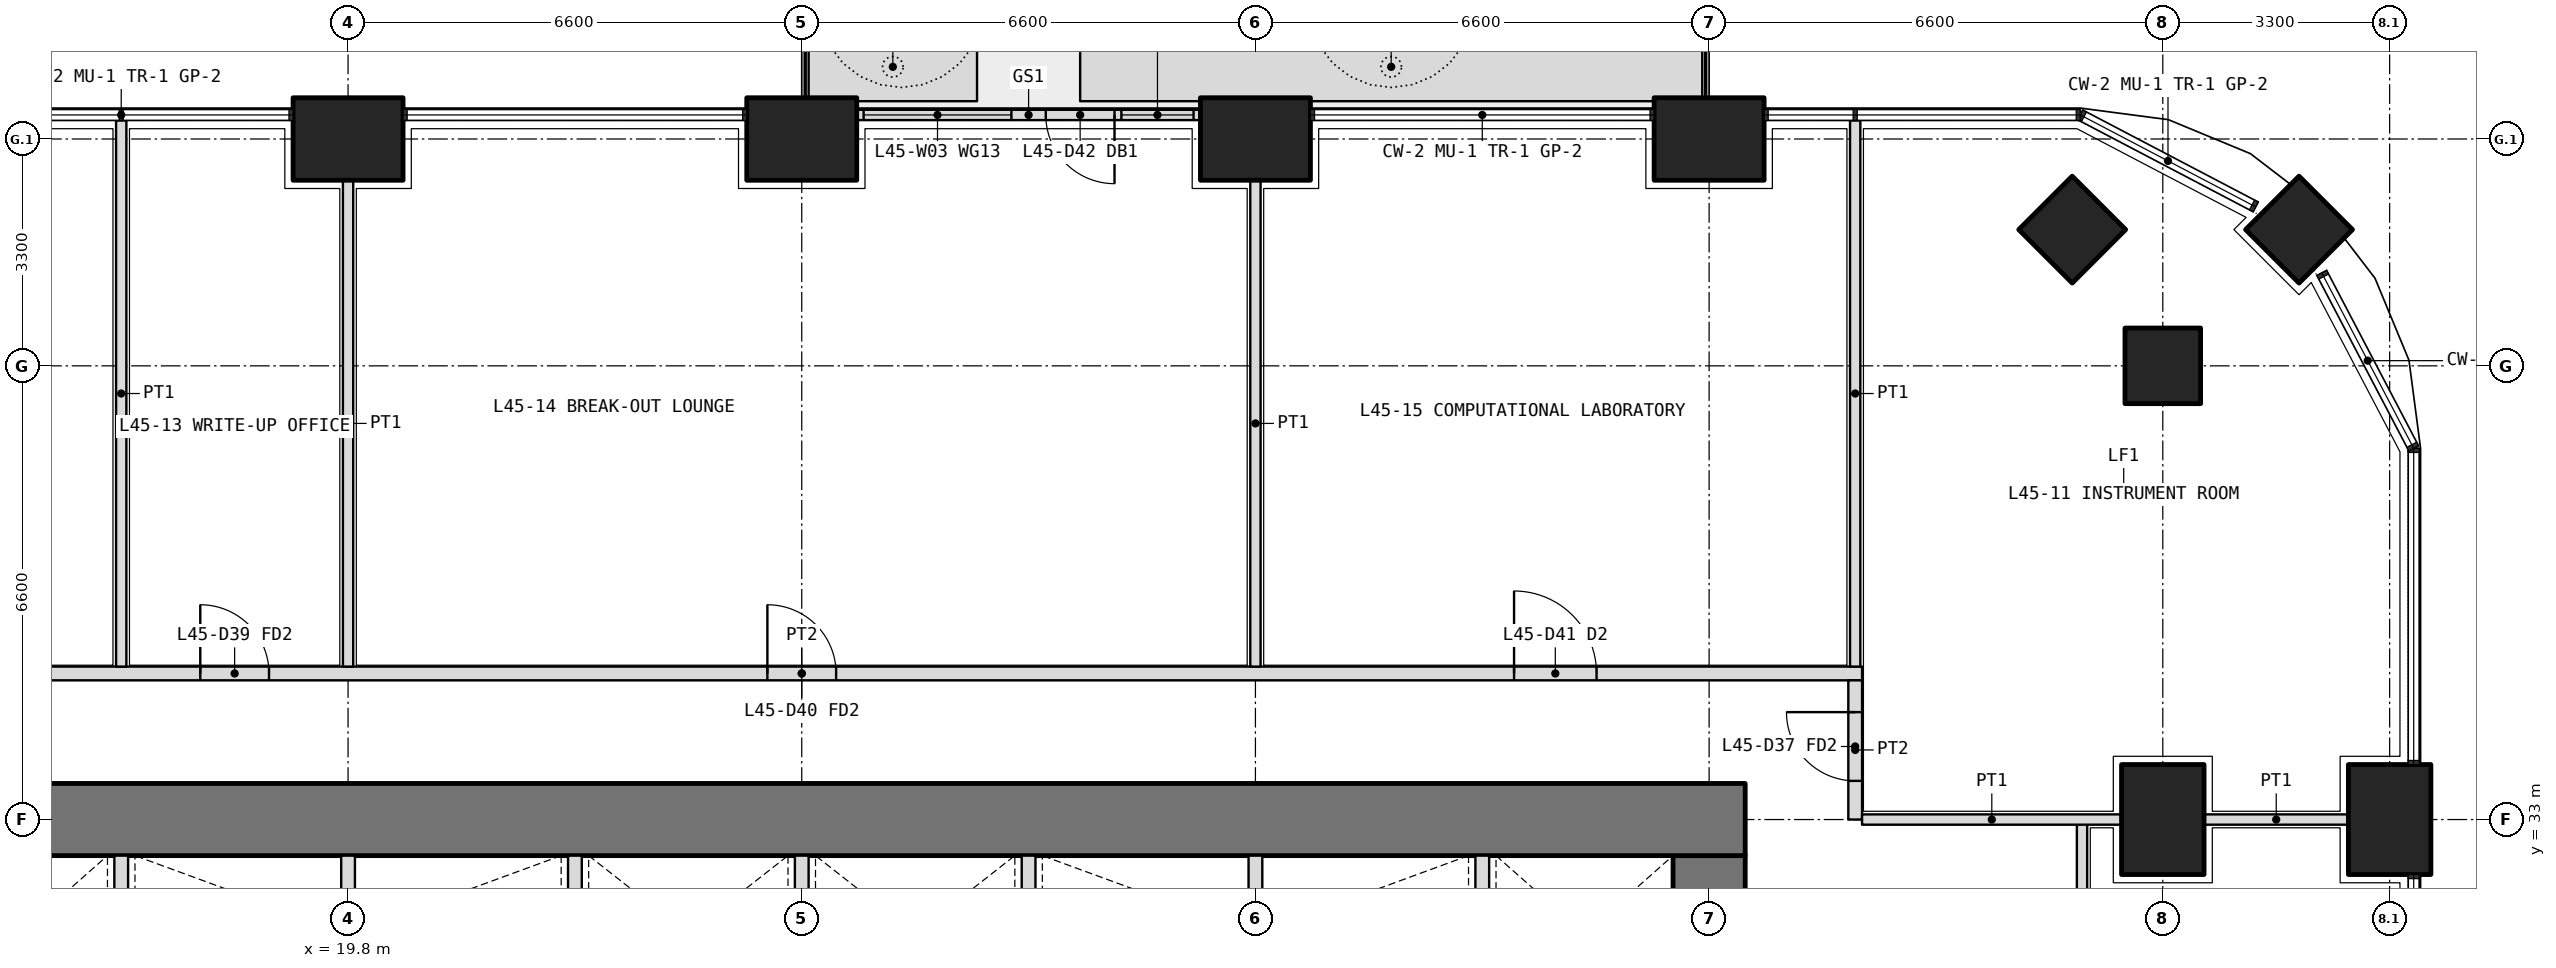
"""IFC4 building model, lengths in metres.
Left out: names, types, materials, properties, quantities, classifications, styles, units other than length and angle.
Written with IfcOpenShell. Run it as: python <this file> out.ifc"""

import sys

from ifc_helpers import new_model, si_unit, direction, frame, frame_2d, origin, origin_2d, place, context, subcontext, project, spatial, polyline, rectangle, outline, extrude, element, fill, save


model = new_model("IFC4")
c1 = context("Model", 3, precision=1e-05, world=origin(), true_north=direction((0.0, 1.0)))
c2 = subcontext(c1, "Body", "Model", "MODEL_VIEW")
j1 = project(units=[si_unit("LENGTHUNIT", "METRE"), si_unit("PLANEANGLEUNIT", "RADIAN")], contexts=[c1])
p1 = place(None, origin())
s1 = spatial("IfcSite", under=j1, at=p1, CompositionType="ELEMENT")
p2 = place(p1, origin())
s2 = spatial("IfcBuilding", under=s1, at=p2, CompositionType="ELEMENT")
p3 = place(p2, frame((0.0, 0.0, 197.7)))
s3 = spatial("IfcBuildingStorey", under=s2, at=p3, CompositionType="ELEMENT", Elevation=197.7)
p4 = place(p3, frame((48.182, 41.582, 0.0), z_axis=(0.0, 0.0, 1.0), x_axis=(0.707106781187, 0.707106781187, 0.0)))
e1 = element("IfcColumn", 1, at=p4, inside=s3, PredefinedType="COLUMN", context=c2, shape_type="SweptSolid", body=[
    extrude(rectangle(XDim=1.1, YDim=1.1, at=origin_2d()), origin(), (0.0, 0.0, 1.0), 4.2),
])
for number, where, z_axis, x_axis in (
    (2, (49.5, 33.0, 0.0), (0.0, 0.0, 1.0), (0.0, 1.0, 0.0)),
    (3, (19.8, 42.9, 0.0), (0.0, 0.0, 1.0), (1.0, 0.0, 0.0)),
    (4, (26.4, 42.9, 0.0), (0.0, 0.0, 1.0), (1.0, 0.0, 0.0)),
    (5, (33.0, 42.9, 0.0), (0.0, 0.0, 1.0), (1.0, 0.0, 0.0)),
    (6, (39.6, 42.9, 0.0), (0.0, 0.0, 1.0), (1.0, 0.0, 0.0)),
):
    element("IfcColumn", number, at=place(p3, frame(where, z_axis=z_axis, x_axis=x_axis)), inside=s3, PredefinedType="COLUMN", context=c2, shape_type="SweptSolid", body=[
        extrude(rectangle(XDim=1.6, YDim=1.2, at=origin_2d()), origin(), (0.0, 0.0, 1.0), 4.2),
    ])
for number, where, z_axis, x_axis in (
    (7, (46.2, 39.6, 0.0), (0.0, 0.0, 1.0), (1.0, 0.0, 0.0)),
    (8, (44.882, 41.582, 0.0), (0.0, 0.0, 1.0), (0.707, 0.707, 0.0)),
):
    element("IfcColumn", number, at=place(p3, frame(where, z_axis=z_axis, x_axis=x_axis)), inside=s3, PredefinedType="COLUMN", context=c2, shape_type="SweptSolid", body=[
        extrude(rectangle(XDim=1.1, YDim=1.1, at=origin_2d()), origin(), (0.0, 0.0, 1.0), 4.2),
    ])
p5 = place(p3, frame((46.2, 33.0, 0.0), z_axis=(0.0, 0.0, 1.0), x_axis=(0.0, 1.0, 0.0)))
e9 = element("IfcColumn", 9, at=p5, inside=s3, PredefinedType="COLUMN", context=c2, shape_type="SweptSolid", body=[
    extrude(rectangle(XDim=1.6, YDim=1.2, at=origin_2d()), origin(), (0.0, 0.0, 1.0), 4.2),
])
p6 = place(p3, origin())
e10 = element("IfcWall", 10, at=p6, inside=s3, PredefinedType="USERDEFINED", context=c2, shape_type="SweptSolid", body=[
    extrude(outline(polyline([(26.5, 43.45), (28.95, 43.45), (28.95, 44.45), (26.5, 44.45), (26.5, 43.45)]), holes=[polyline([(26.65, 43.6), (28.8, 43.6), (28.8, 44.3), (26.65, 44.3), (26.65, 43.6)])]), origin(), (0.0, 0.0, 1.0), 1.05),
])
p7 = place(p3, origin())
e11 = element("IfcWall", 11, at=p7, inside=s3, PredefinedType="USERDEFINED", context=c2, shape_type="SweptSolid", body=[
    extrude(outline(polyline([(30.45, 43.45), (39.5, 43.45), (39.5, 44.45), (30.45, 44.45), (30.45, 43.45)]), holes=[polyline([(30.6, 43.6), (39.35, 43.6), (39.35, 44.3), (30.6, 44.3), (30.6, 43.6)])]), origin(), (0.0, 0.0, 1.0), 1.05),
])
p8 = place(p3, frame((32.2, 43.25, 0.0), z_axis=(0.0, 0.0, 1.0), x_axis=(-1.0, 0.0, 0.0)))
e12 = element("IfcWall", 12, at=p8, inside=s3, PredefinedType="SOLIDWALL", context=c2, shape_type="SweptSolid", body=[
    extrude(rectangle(XDim=5.0, YDim=0.15, at=frame_2d((2.5, 0.0))), origin(), (0.0, 0.0, 1.0), 2.7),
])
p9 = place(p8, frame((1.25, 0.0, 0.0)))
e13 = element("IfcOpeningElement", 13, at=p9, cuts=e12, PredefinedType="OPENING", context=c2, shape_type="SweptSolid", body=[
    extrude(rectangle(XDim=1.0, YDim=2.4, at=frame_2d((0.5, 1.2))), frame((0.0, 0.085, 0.0), z_axis=(0.0, -1.0, 0.0), x_axis=(1.0, 0.0, 0.0)), (0.0, 0.0, 1.0), 0.17),
])
p10 = place(p8, frame((0.1, 0.0, 0.1)))
e14 = element("IfcOpeningElement", 14, at=p10, cuts=e12, PredefinedType="OPENING", context=c2, shape_type="SweptSolid", body=[
    extrude(rectangle(XDim=1.05, YDim=2.3, at=frame_2d((0.525, 1.15))), frame((0.0, 0.085, 0.0), z_axis=(0.0, -1.0, 0.0), x_axis=(1.0, 0.0, 0.0)), (0.0, 0.0, 1.0), 0.17),
])
p11 = place(p8, frame((2.75, 0.0, 0.1)))
e15 = element("IfcOpeningElement", 15, at=p11, cuts=e12, PredefinedType="OPENING", context=c2, shape_type="SweptSolid", body=[
    extrude(rectangle(XDim=2.15, YDim=2.3, at=frame_2d((1.075, 1.15))), frame((0.0, 0.085, 0.0), z_axis=(0.0, -1.0, 0.0), x_axis=(1.0, 0.0, 0.0)), (0.0, 0.0, 1.0), 0.17),
])
p12 = place(p3, frame((39.6, 13.725, 0.0), z_axis=(0.0, 0.0, 1.0), x_axis=(0.0, 1.0, 0.0)))
e16 = element("IfcWall", 16, at=p12, inside=s3, PredefinedType="SHEAR", context=c2, shape_type="SweptSolid", body=[
    extrude(rectangle(XDim=18.75, YDim=1.05, at=frame_2d((9.375, 0.0))), origin(), (0.0, 0.0, 1.0), 4.2),
])
p13 = place(p12, frame((3.025, 0.0, 0.0)))
e17 = element("IfcOpeningElement", 17, at=p13, cuts=e16, PredefinedType="OPENING", context=c2, shape_type="SweptSolid", body=[
    extrude(rectangle(XDim=1.6, YDim=2.1, at=frame_2d((0.8, 1.05))), frame((0.0, 0.535, 0.0), z_axis=(0.0, -1.0, 0.0), x_axis=(1.0, 0.0, 0.0)), (0.0, 0.0, 1.0), 1.07),
])
p14 = place(p12, frame((13.825, 0.0, 0.0)))
e18 = element("IfcOpeningElement", 18, at=p14, cuts=e16, PredefinedType="OPENING", context=c2, shape_type="SweptSolid", body=[
    extrude(rectangle(XDim=1.6, YDim=2.1, at=frame_2d((0.8, 1.05))), frame((0.0, 0.535, 0.0), z_axis=(0.0, -1.0, 0.0), x_axis=(1.0, 0.0, 0.0)), (0.0, 0.0, 1.0), 1.07),
])
p15 = place(p3, frame((40.125, 33.0, 0.0), z_axis=(0.0, 0.0, 1.0), x_axis=(-1.0, 0.0, 0.0)))
e19 = element("IfcWall", 19, at=p15, inside=s3, PredefinedType="SHEAR", context=c2, shape_type="SweptSolid", body=[
    extrude(rectangle(XDim=27.45, YDim=1.05, at=frame_2d((13.725, 0.0))), origin(), (0.0, 0.0, 1.0), 4.2),
])
for number, where, z_axis, x_axis in (
    (20, (16.5, 30.2, 0.0), (0.0, 0.0, 1.0), (0.0, 1.0, 0.0)),
    (21, (19.8, 30.2, 0.0), (0.0, 0.0, 1.0), (0.0, 1.0, 0.0)),
    (22, (23.1, 30.2, 0.0), (0.0, 0.0, 1.0), (0.0, 1.0, 0.0)),
    (23, (26.4, 30.2, 0.0), (0.0, 0.0, 1.0), (0.0, 1.0, 0.0)),
    (24, (29.7, 30.2, 0.0), (0.0, 0.0, 1.0), (0.0, 1.0, 0.0)),
    (25, (33.0, 30.2, 0.0), (0.0, 0.0, 1.0), (0.0, 1.0, 0.0)),
    (26, (36.3, 30.2, 0.0), (0.0, 0.0, 1.0), (0.0, 1.0, 0.0)),
):
    element("IfcWall", number, at=place(p3, frame(where, z_axis=z_axis, x_axis=x_axis)), inside=s3, PredefinedType="PARTITIONING", context=c2, shape_type="SweptSolid", body=[
        extrude(rectangle(XDim=2.275, YDim=0.2, at=frame_2d((1.138, 0.0))), origin(), (0.0, 0.0, 1.0), 4.2),
    ])
p16 = place(p3, frame((10.975, 35.125, 0.0), z_axis=(0.0, 0.0, 1.0), x_axis=(1.0, 0.0, 0.0)))
e27 = element("IfcWall", 27, at=p16, inside=s3, PredefinedType="PARTITIONING", context=c2, shape_type="SweptSolid", body=[
    extrude(rectangle(XDim=30.85, YDim=0.2, at=frame_2d((15.425, 0.0))), origin(), (0.0, 0.0, 1.0), 2.85),
])
p17 = place(p16, frame((2.212, 0.0, 0.0)))
e28 = element("IfcOpeningElement", 28, at=p17, cuts=e27, PredefinedType="OPENING", context=c2, shape_type="SweptSolid", body=[
    extrude(rectangle(XDim=1.2, YDim=2.1, at=frame_2d((0.6, 1.05))), frame((0.0, 0.11, 0.0), z_axis=(0.0, -1.0, 0.0), x_axis=(1.0, 0.0, 0.0)), (0.0, 0.0, 1.0), 0.22),
])
p18 = place(p16, frame((6.675, 0.0, 0.0)))
e29 = element("IfcOpeningElement", 29, at=p18, cuts=e27, PredefinedType="OPENING", context=c2, shape_type="SweptSolid", body=[
    extrude(rectangle(XDim=1.0, YDim=2.1, at=frame_2d((0.5, 1.05))), frame((0.0, 0.11, 0.0), z_axis=(0.0, -1.0, 0.0), x_axis=(1.0, 0.0, 0.0)), (0.0, 0.0, 1.0), 0.22),
])
p19 = place(p16, frame((14.925, 0.0, 0.0)))
e30 = element("IfcOpeningElement", 30, at=p19, cuts=e27, PredefinedType="OPENING", context=c2, shape_type="SweptSolid", body=[
    extrude(rectangle(XDim=1.0, YDim=2.1, at=frame_2d((0.5, 1.05))), frame((0.0, 0.11, 0.0), z_axis=(0.0, -1.0, 0.0), x_axis=(1.0, 0.0, 0.0)), (0.0, 0.0, 1.0), 0.22),
])
p20 = place(p16, frame((25.788, 0.0, 0.0)))
e31 = element("IfcOpeningElement", 31, at=p20, cuts=e27, PredefinedType="OPENING", context=c2, shape_type="SweptSolid", body=[
    extrude(rectangle(XDim=1.2, YDim=2.1, at=frame_2d((0.6, 1.05))), frame((0.0, 0.11, 0.0), z_axis=(0.0, -1.0, 0.0), x_axis=(1.0, 0.0, 0.0)), (0.0, 0.0, 1.0), 0.22),
])
p21 = place(p3, frame((41.725, 33.0, 0.0), z_axis=(0.0, 0.0, 1.0), x_axis=(0.0, 1.0, 0.0)))
e32 = element("IfcWall", 32, at=p21, inside=s3, PredefinedType="PARTITIONING", context=c2, shape_type="SweptSolid", body=[
    extrude(rectangle(XDim=2.025, YDim=0.2, at=frame_2d((1.012, 0.0))), origin(), (0.0, 0.0, 1.0), 2.85),
])
p22 = place(p21, frame((0.562, 0.0, 0.0)))
e33 = element("IfcOpeningElement", 33, at=p22, cuts=e32, PredefinedType="OPENING", context=c2, shape_type="SweptSolid", body=[
    extrude(rectangle(XDim=1.0, YDim=2.1, at=frame_2d((0.5, 1.05))), frame((0.0, 0.11, 0.0), z_axis=(0.0, -1.0, 0.0), x_axis=(1.0, 0.0, 0.0)), (0.0, 0.0, 1.0), 0.22),
])
p23 = place(p3, frame((41.725, 43.17, 0.0), z_axis=(0.0, 0.0, 1.0), x_axis=(0.0, -1.0, 0.0)))
e34 = element("IfcWall", 34, at=p23, inside=s3, PredefinedType="PARTITIONING", context=c2, shape_type="SweptSolid", body=[
    extrude(rectangle(XDim=7.945, YDim=0.15, at=frame_2d((3.972, 0.0))), origin(), (0.0, 0.0, 1.0), 2.7),
])
p24 = place(p3, frame((45.025, 29.7, 0.0), z_axis=(0.0, 0.0, 1.0), x_axis=(0.0, 1.0, 0.0)))
e35 = element("IfcWall", 35, at=p24, inside=s3, PredefinedType="PARTITIONING", context=c2, shape_type="SweptSolid", body=[
    extrude(rectangle(XDim=3.3, YDim=0.15, at=frame_2d((1.65, 0.0))), origin(), (0.0, 0.0, 1.0), 2.85),
])
p25 = place(p24, frame((1.15, 0.0, 0.0)))
e36 = element("IfcOpeningElement", 36, at=p25, cuts=e35, PredefinedType="OPENING", context=c2, shape_type="SweptSolid", body=[
    extrude(rectangle(XDim=1.0, YDim=2.1, at=frame_2d((0.5, 1.05))), frame((0.0, 0.085, 0.0), z_axis=(0.0, -1.0, 0.0), x_axis=(1.0, 0.0, 0.0)), (0.0, 0.0, 1.0), 0.17),
])
p26 = place(p3, frame((48.9, 33.0, 0.0), z_axis=(0.0, 0.0, 1.0), x_axis=(-1.0, 0.0, 0.0)))
e37 = element("IfcWall", 37, at=p26, inside=s3, PredefinedType="PARTITIONING", context=c2, shape_type="SweptSolid", body=[
    extrude(rectangle(XDim=2.1, YDim=0.15, at=frame_2d((1.05, 0.0))), origin(), (0.0, 0.0, 1.0), 2.85),
])
p27 = place(p3, frame((45.6, 33.0, 0.0), z_axis=(0.0, 0.0, 1.0), x_axis=(-1.0, 0.0, 0.0)))
e38 = element("IfcWall", 38, at=p27, inside=s3, PredefinedType="PARTITIONING", context=c2, shape_type="SweptSolid", body=[
    extrude(rectangle(XDim=3.775, YDim=0.15, at=frame_2d((1.888, 0.0))), origin(), (0.0, 0.0, 1.0), 2.85),
])
p28 = place(p3, frame((16.5, 43.17, 0.0), z_axis=(0.0, 0.0, 1.0), x_axis=(0.0, -1.0, 0.0)))
e39 = element("IfcWall", 39, at=p28, inside=s3, PredefinedType="PARTITIONING", context=c2, shape_type="SweptSolid", body=[
    extrude(rectangle(XDim=7.945, YDim=0.15, at=frame_2d((3.972, 0.0))), origin(), (0.0, 0.0, 1.0), 2.7),
])
for number, where, z_axis, x_axis in (
    (40, (19.8, 42.3, 0.0), (0.0, 0.0, 1.0), (0.0, -1.0, 0.0)),
    (41, (33.0, 42.3, 0.0), (0.0, 0.0, 1.0), (0.0, -1.0, 0.0)),
):
    element("IfcWall", number, at=place(p3, frame(where, z_axis=z_axis, x_axis=x_axis)), inside=s3, PredefinedType="PARTITIONING", context=c2, shape_type="SweptSolid", body=[
        extrude(rectangle(XDim=7.075, YDim=0.15, at=frame_2d((3.538, 0.0))), origin(), (0.0, 0.0, 1.0), 2.85),
    ])
p29 = place(p9, origin())
e42 = element("IfcDoor", 42, at=p29, inside=s3, OperationType="SINGLE_SWING_LEFT", PredefinedType="DOOR", context=c2, shape_type="SweptSolid", body=[
    extrude(rectangle(XDim=1.0, YDim=2.4, at=frame_2d((0.5, 1.2))), frame((0.0, 0.025, 0.0), z_axis=(0.0, -1.0, 0.0), x_axis=(1.0, 0.0, 0.0)), (0.0, 0.0, 1.0), 0.05),
])
fill(e13, e42)
p30 = place(p10, origin())
e43 = element("IfcWindow", 43, at=p30, inside=s3, PartitioningType="SINGLE_PANEL", PredefinedType="WINDOW", context=c2, shape_type="SweptSolid", body=[
    extrude(rectangle(XDim=1.05, YDim=2.3, at=frame_2d((0.525, 1.15))), frame((0.0, 0.03, 0.0), z_axis=(0.0, -1.0, 0.0), x_axis=(1.0, 0.0, 0.0)), (0.0, 0.0, 1.0), 0.06),
])
fill(e14, e43)
p31 = place(p11, origin())
e44 = element("IfcWindow", 44, at=p31, inside=s3, PartitioningType="SINGLE_PANEL", PredefinedType="WINDOW", context=c2, shape_type="SweptSolid", body=[
    extrude(rectangle(XDim=2.15, YDim=2.3, at=frame_2d((1.075, 1.15))), frame((0.0, 0.03, 0.0), z_axis=(0.0, -1.0, 0.0), x_axis=(1.0, 0.0, 0.0)), (0.0, 0.0, 1.0), 0.06),
])
fill(e15, e44)
p32 = place(p22, origin())
e45 = element("IfcDoor", 45, at=p32, inside=s3, OperationType="SINGLE_SWING_RIGHT", PredefinedType="DOOR", context=c2, shape_type="SweptSolid", body=[
    extrude(rectangle(XDim=1.0, YDim=2.1, at=frame_2d((0.5, 1.05))), frame((0.0, 0.025, 0.0), z_axis=(0.0, -1.0, 0.0), x_axis=(1.0, 0.0, 0.0)), (0.0, 0.0, 1.0), 0.05),
])
fill(e33, e45)
p33 = place(p18, origin())
e46 = element("IfcDoor", 46, at=p33, inside=s3, OperationType="SINGLE_SWING_LEFT", PredefinedType="DOOR", context=c2, shape_type="SweptSolid", body=[
    extrude(rectangle(XDim=1.0, YDim=2.1, at=frame_2d((0.5, 1.05))), frame((0.0, 0.025, 0.0), z_axis=(0.0, -1.0, 0.0), x_axis=(1.0, 0.0, 0.0)), (0.0, 0.0, 1.0), 0.05),
])
fill(e29, e46)
p34 = place(p19, origin())
e47 = element("IfcDoor", 47, at=p34, inside=s3, OperationType="SINGLE_SWING_LEFT", PredefinedType="DOOR", context=c2, shape_type="SweptSolid", body=[
    extrude(rectangle(XDim=1.0, YDim=2.1, at=frame_2d((0.5, 1.05))), frame((0.0, 0.025, 0.0), z_axis=(0.0, -1.0, 0.0), x_axis=(1.0, 0.0, 0.0)), (0.0, 0.0, 1.0), 0.05),
])
fill(e30, e47)
p35 = place(p20, origin())
e48 = element("IfcDoor", 48, at=p35, inside=s3, OperationType="DOUBLE_DOOR_SINGLE_SWING", PredefinedType="DOOR", context=c2, shape_type="SweptSolid", body=[
    extrude(rectangle(XDim=1.2, YDim=2.1, at=frame_2d((0.6, 1.05))), frame((0.0, 0.025, 0.0), z_axis=(0.0, -1.0, 0.0), x_axis=(1.0, 0.0, 0.0)), (0.0, 0.0, 1.0), 0.05),
])
fill(e31, e48)
save(model, sys.argv[1])
